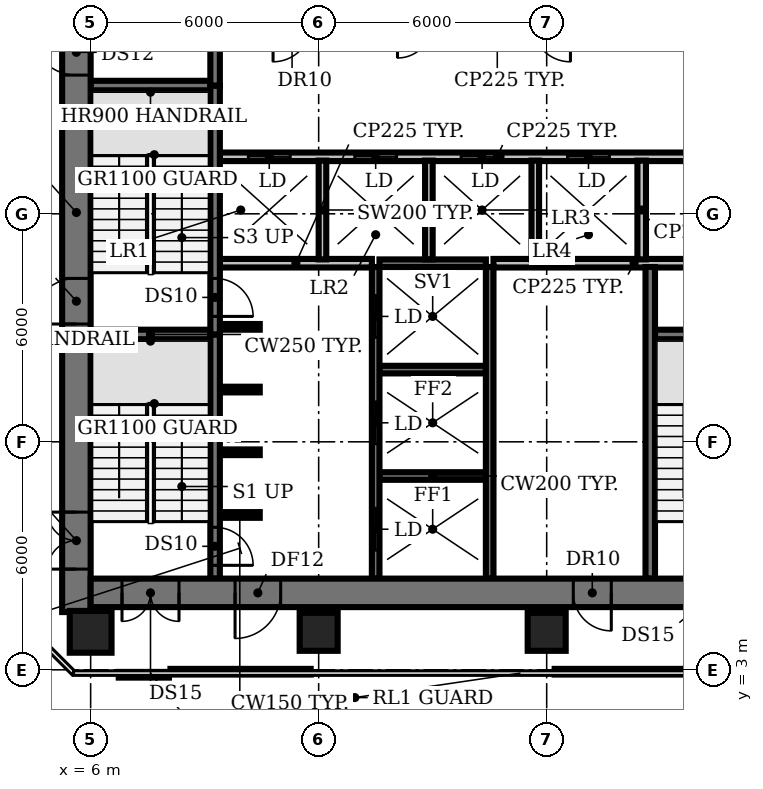
"""IFC4 building model, lengths in metres.
Left out: names, types, materials, properties, quantities, classifications, styles, units other than length and angle.
Written with IfcOpenShell. Run it as: python <this file> out.ifc"""

import sys

from ifc_helpers import new_model, si_unit, direction, frame, frame_2d, origin, origin_2d, place, context, subcontext, project, spatial, rectangle, circle, extrude, element, fill, save


model = new_model("IFC4")
c1 = context("Model", 3, precision=1e-05, world=origin(), true_north=direction((0.0, 1.0)))
c2 = subcontext(c1, "Body", "Model", "MODEL_VIEW")
j1 = project(units=[si_unit("LENGTHUNIT", "METRE"), si_unit("PLANEANGLEUNIT", "RADIAN")], contexts=[c1])
p1 = place(None, origin())
s1 = spatial("IfcSite", under=j1, at=p1, CompositionType="ELEMENT")
p2 = place(p1, origin())
s2 = spatial("IfcBuilding", under=s1, at=p2, CompositionType="ELEMENT")
p3 = place(p2, frame((0.0, 0.0, 87.8)))
s3 = spatial("IfcBuildingStorey", under=s2, at=p3, CompositionType="ELEMENT", Elevation=87.8)
p4 = place(p3, frame((6.0, 4.0, -0.35), z_axis=(0.0, 0.0, 1.0), x_axis=(1.0, 0.0, 0.0)))
e1 = element("IfcColumn", 1, at=p4, inside=s3, PredefinedType="COLUMN", context=c2, shape_type="SweptSolid", body=[
    extrude(circle(Radius=0.55, at=origin_2d()), origin(), (0.0, 0.0, 1.0), 4.2),
])
for number, where, z_axis, x_axis in (
    (2, (12.0, 4.0, -0.35), (0.0, 0.0, 1.0), (1.0, 0.0, 0.0)),
    (3, (18.0, 4.0, -0.35), (0.0, 0.0, 1.0), (1.0, 0.0, 0.0)),
):
    element("IfcColumn", number, at=place(p3, frame(where, z_axis=z_axis, x_axis=x_axis)), inside=s3, PredefinedType="COLUMN", context=c2, shape_type="SweptSolid", body=[
        extrude(rectangle(XDim=1.0, YDim=1.0, at=origin_2d()), origin(), (0.0, 0.0, 1.0), 4.2),
    ])
p5 = place(p3, frame((9.4, 7.075, 0.0), z_axis=(0.0, 0.0, 1.0), x_axis=(1.0, 0.0, 0.0)))
e4 = element("IfcWall", 4, at=p5, inside=s3, PredefinedType="SHEAR", context=c2, shape_type="SweptSolid", body=[
    extrude(rectangle(XDim=1.05, YDim=0.15, at=frame_2d((0.525, 0.0))), origin(), (0.0, 0.0, 1.0), 3.85),
])
p6 = place(p3, frame((13.6, 8.1, 0.0), z_axis=(0.0, 0.0, 1.0), x_axis=(1.0, 0.0, 0.0)))
e5 = element("IfcWall", 5, at=p6, inside=s3, PredefinedType="SHEAR", context=c2, shape_type="SweptSolid", body=[
    extrude(rectangle(XDim=2.8, YDim=0.2, at=frame_2d((1.4, 0.0))), origin(), (0.0, 0.0, 1.0), 3.85),
])
for number, where, z_axis, x_axis in (
    (6, (9.4, 8.725, 0.0), (0.0, 0.0, 1.0), (1.0, 0.0, 0.0)),
    (7, (9.4, 10.375, 0.0), (0.0, 0.0, 1.0), (1.0, 0.0, 0.0)),
):
    element("IfcWall", number, at=place(p3, frame(where, z_axis=z_axis, x_axis=x_axis)), inside=s3, PredefinedType="SHEAR", context=c2, shape_type="SweptSolid", body=[
        extrude(rectangle(XDim=1.05, YDim=0.15, at=frame_2d((0.525, 0.0))), origin(), (0.0, 0.0, 1.0), 3.85),
    ])
p7 = place(p3, frame((13.6, 10.9, 0.0), z_axis=(0.0, 0.0, 1.0), x_axis=(1.0, 0.0, 0.0)))
e8 = element("IfcWall", 8, at=p7, inside=s3, PredefinedType="SHEAR", context=c2, shape_type="SweptSolid", body=[
    extrude(rectangle(XDim=2.8, YDim=0.2, at=frame_2d((1.4, 0.0))), origin(), (0.0, 0.0, 1.0), 3.85),
])
for number, where, z_axis, x_axis in (
    (9, (6.0, 11.825, 0.0), (0.0, 0.0, 1.0), (1.0, 0.0, 0.0)),
    (10, (20.85, 11.825, 0.0), (0.0, 0.0, 1.0), (1.0, 0.0, 0.0)),
):
    element("IfcWall", number, at=place(p3, frame(where, z_axis=z_axis, x_axis=x_axis)), inside=s3, PredefinedType="SHEAR", context=c2, shape_type="SweptSolid", body=[
        extrude(rectangle(XDim=3.15, YDim=0.25, at=frame_2d((1.575, 0.0))), origin(), (0.0, 0.0, 1.0), 3.85),
    ])
p8 = place(p3, frame((9.4, 12.025, 0.0), z_axis=(0.0, 0.0, 1.0), x_axis=(1.0, 0.0, 0.0)))
e11 = element("IfcWall", 11, at=p8, inside=s3, PredefinedType="SHEAR", context=c2, shape_type="SweptSolid", body=[
    extrude(rectangle(XDim=1.05, YDim=0.15, at=frame_2d((0.525, 0.0))), origin(), (0.0, 0.0, 1.0), 3.85),
])
p9 = place(p3, frame((9.4, 13.7, 0.0), z_axis=(0.0, 0.0, 1.0), x_axis=(1.0, 0.0, 0.0)))
e12 = element("IfcWall", 12, at=p9, inside=s3, PredefinedType="PARTITIONING", context=c2, shape_type="SweptSolid", body=[
    extrude(rectangle(XDim=4.0, YDim=0.225, at=frame_2d((2.0, 0.0))), origin(), (0.0, 0.0, 1.0), 3.85),
])
p10 = place(p3, frame((13.6, 13.7, 0.0), z_axis=(0.0, 0.0, 1.0), x_axis=(1.0, 0.0, 0.0)))
e13 = element("IfcWall", 13, at=p10, inside=s3, PredefinedType="SHEAR", context=c2, shape_type="SweptSolid", body=[
    extrude(rectangle(XDim=2.8, YDim=0.2, at=frame_2d((1.4, 0.0))), origin(), (0.0, 0.0, 1.0), 3.85),
])
p11 = place(p3, frame((16.6, 13.7, 0.0), z_axis=(0.0, 0.0, 1.0), x_axis=(1.0, 0.0, 0.0)))
e14 = element("IfcWall", 14, at=p11, inside=s3, PredefinedType="PARTITIONING", context=c2, shape_type="SweptSolid", body=[
    extrude(rectangle(XDim=7.4, YDim=0.225, at=frame_2d((3.7, 0.0))), origin(), (0.0, 0.0, 1.0), 3.85),
])
p12 = place(p3, frame((9.4, 16.5, 0.0), z_axis=(0.0, 0.0, 1.0), x_axis=(1.0, 0.0, 0.0)))
e15 = element("IfcWall", 15, at=p12, inside=s3, PredefinedType="PARTITIONING", context=c2, shape_type="SweptSolid", body=[
    extrude(rectangle(XDim=14.6, YDim=0.225, at=frame_2d((7.3, 0.0))), origin(), (0.0, 0.0, 1.0), 3.85),
])
p13 = place(p12, frame((0.75, 0.0, 0.0)))
e16 = element("IfcOpeningElement", 16, at=p13, cuts=e15, PredefinedType="OPENING", context=c2, shape_type="SweptSolid", body=[
    extrude(rectangle(XDim=1.1, YDim=2.1, at=frame_2d((0.55, 1.05))), frame((0.0, 0.123, 0.0), z_axis=(0.0, -1.0, 0.0), x_axis=(1.0, 0.0, 0.0)), (0.0, 0.0, 1.0), 0.245),
])
p14 = place(p12, frame((3.55, 0.0, 0.0)))
e17 = element("IfcOpeningElement", 17, at=p14, cuts=e15, PredefinedType="OPENING", context=c2, shape_type="SweptSolid", body=[
    extrude(rectangle(XDim=1.1, YDim=2.1, at=frame_2d((0.55, 1.05))), frame((0.0, 0.123, 0.0), z_axis=(0.0, -1.0, 0.0), x_axis=(1.0, 0.0, 0.0)), (0.0, 0.0, 1.0), 0.245),
])
p15 = place(p12, frame((6.35, 0.0, 0.0)))
e18 = element("IfcOpeningElement", 18, at=p15, cuts=e15, PredefinedType="OPENING", context=c2, shape_type="SweptSolid", body=[
    extrude(rectangle(XDim=1.1, YDim=2.1, at=frame_2d((0.55, 1.05))), frame((0.0, 0.123, 0.0), z_axis=(0.0, -1.0, 0.0), x_axis=(1.0, 0.0, 0.0)), (0.0, 0.0, 1.0), 0.245),
])
p16 = place(p12, frame((9.15, 0.0, 0.0)))
e19 = element("IfcOpeningElement", 19, at=p16, cuts=e15, PredefinedType="OPENING", context=c2, shape_type="SweptSolid", body=[
    extrude(rectangle(XDim=1.1, YDim=2.1, at=frame_2d((0.55, 1.05))), frame((0.0, 0.123, 0.0), z_axis=(0.0, -1.0, 0.0), x_axis=(1.0, 0.0, 0.0)), (0.0, 0.0, 1.0), 0.245),
])
p17 = place(p12, frame((12.4, 0.0, 0.0)))
e20 = element("IfcOpeningElement", 20, at=p17, cuts=e15, PredefinedType="OPENING", context=c2, shape_type="SweptSolid", body=[
    extrude(rectangle(XDim=1.0, YDim=2.1, at=frame_2d((0.5, 1.05))), frame((0.0, 0.123, 0.0), z_axis=(0.0, -1.0, 0.0), x_axis=(1.0, 0.0, 0.0)), (0.0, 0.0, 1.0), 0.245),
])
p18 = place(p3, frame((6.0, 18.375, 0.0), z_axis=(0.0, 0.0, 1.0), x_axis=(1.0, 0.0, 0.0)))
e21 = element("IfcWall", 21, at=p18, inside=s3, PredefinedType="SHEAR", context=c2, shape_type="SweptSolid", body=[
    extrude(rectangle(XDim=3.15, YDim=0.25, at=frame_2d((1.575, 0.0))), origin(), (0.0, 0.0, 1.0), 3.85),
])
p19 = place(p3, frame((9.275, 11.825, 0.0), z_axis=(0.0, 0.0, 1.0), x_axis=(0.0, -1.0, 0.0)))
e22 = element("IfcWall", 22, at=p19, inside=s3, PredefinedType="SHEAR", context=c2, shape_type="SweptSolid", body=[
    extrude(rectangle(XDim=6.425, YDim=0.25, at=frame_2d((3.212, 0.0))), origin(), (0.0, 0.0, 1.0), 3.85),
])
p20 = place(p19, frame((5.075, 0.0, 0.0)))
e23 = element("IfcOpeningElement", 23, at=p20, cuts=e22, PredefinedType="OPENING", context=c2, shape_type="SweptSolid", body=[
    extrude(rectangle(XDim=1.0, YDim=2.1, at=frame_2d((0.5, 1.05))), frame((0.0, 0.135, 0.0), z_axis=(0.0, -1.0, 0.0), x_axis=(1.0, 0.0, 0.0)), (0.0, 0.0, 1.0), 0.27),
])
p21 = place(p3, frame((9.275, 18.375, 0.0), z_axis=(0.0, 0.0, 1.0), x_axis=(0.0, -1.0, 0.0)))
e24 = element("IfcWall", 24, at=p21, inside=s3, PredefinedType="SHEAR", context=c2, shape_type="SweptSolid", body=[
    extrude(rectangle(XDim=6.55, YDim=0.25, at=frame_2d((3.275, 0.0))), origin(), (0.0, 0.0, 1.0), 3.85),
])
p22 = place(p21, frame((5.075, 0.0, 0.0)))
e25 = element("IfcOpeningElement", 25, at=p22, cuts=e24, PredefinedType="OPENING", context=c2, shape_type="SweptSolid", body=[
    extrude(rectangle(XDim=1.0, YDim=2.1, at=frame_2d((0.5, 1.05))), frame((0.0, 0.135, 0.0), z_axis=(0.0, -1.0, 0.0), x_axis=(1.0, 0.0, 0.0)), (0.0, 0.0, 1.0), 0.27),
])
p23 = place(p3, frame((9.275, 18.375, 0.0), z_axis=(0.0, 0.0, 1.0), x_axis=(0.0, 1.0, 0.0)))
e26 = element("IfcWall", 26, at=p23, inside=s3, PredefinedType="SHEAR", context=c2, shape_type="SweptSolid", body=[
    extrude(rectangle(XDim=6.425, YDim=0.25, at=frame_2d((3.212, 0.0))), origin(), (0.0, 0.0, 1.0), 3.85),
])
p24 = place(p3, frame((12.1, 13.8, 0.0), z_axis=(0.0, 0.0, 1.0), x_axis=(0.0, 1.0, 0.0)))
e27 = element("IfcWall", 27, at=p24, inside=s3, PredefinedType="SOLIDWALL", context=c2, shape_type="SweptSolid", body=[
    extrude(rectangle(XDim=2.6, YDim=0.2, at=frame_2d((1.3, 0.0))), origin(), (0.0, 0.0, 1.0), 3.85),
])
p25 = place(p3, frame((13.5, 5.4, 0.0), z_axis=(0.0, 0.0, 1.0), x_axis=(0.0, 1.0, 0.0)))
e28 = element("IfcWall", 28, at=p25, inside=s3, PredefinedType="SHEAR", context=c2, shape_type="SweptSolid", body=[
    extrude(rectangle(XDim=8.2, YDim=0.2, at=frame_2d((4.1, 0.0))), origin(), (0.0, 0.0, 1.0), 3.85),
])
p26 = place(p25, frame((0.75, 0.0, 0.0)))
e29 = element("IfcOpeningElement", 29, at=p26, cuts=e28, PredefinedType="OPENING", context=c2, shape_type="SweptSolid", body=[
    extrude(rectangle(XDim=1.1, YDim=2.1, at=frame_2d((0.55, 1.05))), frame((0.0, 0.11, 0.0), z_axis=(0.0, -1.0, 0.0), x_axis=(1.0, 0.0, 0.0)), (0.0, 0.0, 1.0), 0.22),
])
p27 = place(p25, frame((3.55, 0.0, 0.0)))
e30 = element("IfcOpeningElement", 30, at=p27, cuts=e28, PredefinedType="OPENING", context=c2, shape_type="SweptSolid", body=[
    extrude(rectangle(XDim=1.1, YDim=2.1, at=frame_2d((0.55, 1.05))), frame((0.0, 0.11, 0.0), z_axis=(0.0, -1.0, 0.0), x_axis=(1.0, 0.0, 0.0)), (0.0, 0.0, 1.0), 0.22),
])
p28 = place(p25, frame((6.35, 0.0, 0.0)))
e31 = element("IfcOpeningElement", 31, at=p28, cuts=e28, PredefinedType="OPENING", context=c2, shape_type="SweptSolid", body=[
    extrude(rectangle(XDim=1.1, YDim=2.1, at=frame_2d((0.55, 1.05))), frame((0.0, 0.11, 0.0), z_axis=(0.0, -1.0, 0.0), x_axis=(1.0, 0.0, 0.0)), (0.0, 0.0, 1.0), 0.22),
])
p29 = place(p3, frame((14.9, 13.8, 0.0), z_axis=(0.0, 0.0, 1.0), x_axis=(0.0, 1.0, 0.0)))
e32 = element("IfcWall", 32, at=p29, inside=s3, PredefinedType="SOLIDWALL", context=c2, shape_type="SweptSolid", body=[
    extrude(rectangle(XDim=2.6, YDim=0.2, at=frame_2d((1.3, 0.0))), origin(), (0.0, 0.0, 1.0), 3.85),
])
p30 = place(p3, frame((16.5, 5.4, 0.0), z_axis=(0.0, 0.0, 1.0), x_axis=(0.0, 1.0, 0.0)))
e33 = element("IfcWall", 33, at=p30, inside=s3, PredefinedType="SHEAR", context=c2, shape_type="SweptSolid", body=[
    extrude(rectangle(XDim=8.2, YDim=0.2, at=frame_2d((4.1, 0.0))), origin(), (0.0, 0.0, 1.0), 3.85),
])
p31 = place(p3, frame((17.7, 13.8, 0.0), z_axis=(0.0, 0.0, 1.0), x_axis=(0.0, 1.0, 0.0)))
e34 = element("IfcWall", 34, at=p31, inside=s3, PredefinedType="SOLIDWALL", context=c2, shape_type="SweptSolid", body=[
    extrude(rectangle(XDim=2.6, YDim=0.2, at=frame_2d((1.3, 0.0))), origin(), (0.0, 0.0, 1.0), 3.85),
])
p32 = place(p3, frame((20.5, 13.8, 0.0), z_axis=(0.0, 0.0, 1.0), x_axis=(0.0, 1.0, 0.0)))
e35 = element("IfcWall", 35, at=p32, inside=s3, PredefinedType="PARTITIONING", context=c2, shape_type="SweptSolid", body=[
    extrude(rectangle(XDim=2.6, YDim=0.225, at=frame_2d((1.3, 0.0))), origin(), (0.0, 0.0, 1.0), 3.85),
])
p33 = place(p3, frame((20.725, 5.4, 0.0), z_axis=(0.0, 0.0, 1.0), x_axis=(0.0, 1.0, 0.0)))
e36 = element("IfcWall", 36, at=p33, inside=s3, PredefinedType="SHEAR", context=c2, shape_type="SweptSolid", body=[
    extrude(rectangle(XDim=8.2, YDim=0.25, at=frame_2d((4.1, 0.0))), origin(), (0.0, 0.0, 1.0), 3.85),
])
p34 = place(p3, frame((5.625, 4.52, 0.0), z_axis=(0.0, 0.0, 1.0), x_axis=(0.0, 1.0, 0.0)))
e37 = element("IfcWall", 37, at=p34, inside=s3, PredefinedType="SHEAR", context=c2, shape_type="SweptSolid", body=[
    extrude(rectangle(XDim=21.03, YDim=0.75, at=frame_2d((10.515, 0.0))), origin(), (0.0, 0.0, 1.0), 3.85),
])
p35 = place(p34, frame((1.13, 0.0, 0.0)))
e38 = element("IfcOpeningElement", 38, at=p35, cuts=e37, PredefinedType="OPENING", context=c2, shape_type="SweptSolid", body=[
    extrude(rectangle(XDim=1.5, YDim=2.1, at=frame_2d((0.75, 1.05))), frame((0.0, 0.385, 0.0), z_axis=(0.0, -1.0, 0.0), x_axis=(1.0, 0.0, 0.0)), (0.0, 0.0, 1.0), 0.77),
])
p36 = place(p34, frame((7.58, 0.0, 0.0)))
e39 = element("IfcOpeningElement", 39, at=p36, cuts=e37, PredefinedType="OPENING", context=c2, shape_type="SweptSolid", body=[
    extrude(rectangle(XDim=1.2, YDim=2.1, at=frame_2d((0.6, 1.05))), frame((0.0, 0.385, 0.0), z_axis=(0.0, -1.0, 0.0), x_axis=(1.0, 0.0, 0.0)), (0.0, 0.0, 1.0), 0.77),
])
p37 = place(p34, frame((14.13, 0.0, 0.0)))
e40 = element("IfcOpeningElement", 40, at=p37, cuts=e37, PredefinedType="OPENING", context=c2, shape_type="SweptSolid", body=[
    extrude(rectangle(XDim=1.2, YDim=2.1, at=frame_2d((0.6, 1.05))), frame((0.0, 0.385, 0.0), z_axis=(0.0, -1.0, 0.0), x_axis=(1.0, 0.0, 0.0)), (0.0, 0.0, 1.0), 0.77),
])
p38 = place(p3, frame((24.0, 5.025, 0.0), z_axis=(0.0, 0.0, 1.0), x_axis=(-1.0, 0.0, 0.0)))
e41 = element("IfcWall", 41, at=p38, inside=s3, PredefinedType="SHEAR", context=c2, shape_type="SweptSolid", body=[
    extrude(rectangle(XDim=18.0, YDim=0.75, at=frame_2d((9.0, 0.0))), origin(), (0.0, 0.0, 1.0), 3.85),
])
p39 = place(p38, frame((0.825, 0.0, 0.0)))
e42 = element("IfcOpeningElement", 42, at=p39, cuts=e41, PredefinedType="OPENING", context=c2, shape_type="SweptSolid", body=[
    extrude(rectangle(XDim=1.5, YDim=2.1, at=frame_2d((0.75, 1.05))), frame((0.0, 0.385, 0.0), z_axis=(0.0, -1.0, 0.0), x_axis=(1.0, 0.0, 0.0)), (0.0, 0.0, 1.0), 0.77),
])
p40 = place(p38, frame((15.675, 0.0, 0.0)))
e43 = element("IfcOpeningElement", 43, at=p40, cuts=e41, PredefinedType="OPENING", context=c2, shape_type="SweptSolid", body=[
    extrude(rectangle(XDim=1.5, YDim=2.1, at=frame_2d((0.75, 1.05))), frame((0.0, 0.385, 0.0), z_axis=(0.0, -1.0, 0.0), x_axis=(1.0, 0.0, 0.0)), (0.0, 0.0, 1.0), 0.77),
])
p41 = place(p38, frame((13.0, 0.0, 0.0)))
e44 = element("IfcOpeningElement", 44, at=p41, cuts=e41, PredefinedType="OPENING", context=c2, shape_type="SweptSolid", body=[
    extrude(rectangle(XDim=1.2, YDim=2.1, at=frame_2d((0.6, 1.05))), frame((0.0, 0.385, 0.0), z_axis=(0.0, -1.0, 0.0), x_axis=(1.0, 0.0, 0.0)), (0.0, 0.0, 1.0), 0.77),
])
p42 = place(p38, frame((4.3, 0.0, 0.0)))
e45 = element("IfcOpeningElement", 45, at=p42, cuts=e41, PredefinedType="OPENING", context=c2, shape_type="SweptSolid", body=[
    extrude(rectangle(XDim=1.0, YDim=2.1, at=frame_2d((0.5, 1.05))), frame((0.0, 0.385, 0.0), z_axis=(0.0, -1.0, 0.0), x_axis=(1.0, 0.0, 0.0)), (0.0, 0.0, 1.0), 0.77),
])
p43 = place(p3, frame((6.74, 2.87, 0.0), z_axis=(0.0, 0.0, 1.0), x_axis=(1.0, 0.0, 0.0)))
e46 = element("IfcWall", 46, at=p43, inside=s3, PredefinedType="PARTITIONING", context=c2, shape_type="SweptSolid", body=[
    extrude(rectangle(XDim=1.32, YDim=0.15, at=frame_2d((0.66, 0.0))), origin(), (0.0, 0.0, 1.0), 2.83),
])
p44 = place(p3, frame((8.1, 2.95, 0.0), z_axis=(0.0, 0.0, 1.0), x_axis=(1.0, 0.0, 0.0)))
e47 = element("IfcWall", 47, at=p44, inside=s3, PredefinedType="PARTITIONING", context=c2, shape_type="SweptSolid", body=[
    extrude(rectangle(XDim=3.69, YDim=0.15, at=frame_2d((1.845, 0.0))), origin(), (0.0, 0.0, 1.0), 2.83),
])
p45 = place(p3, frame((18.21, 2.95, 0.0), z_axis=(0.0, 0.0, 1.0), x_axis=(1.0, 0.0, 0.0)))
e48 = element("IfcWall", 48, at=p45, inside=s3, PredefinedType="PARTITIONING", context=c2, shape_type="SweptSolid", body=[
    extrude(rectangle(XDim=3.75, YDim=0.15, at=frame_2d((1.875, 0.0))), origin(), (0.0, 0.0, 1.0), 2.83),
])
p46 = place(p13, origin())
e49 = element("IfcDoor", 49, at=p46, inside=s3, OperationType="DOUBLE_DOOR_SLIDING", PredefinedType="DOOR", context=c2, shape_type="SweptSolid", body=[
    extrude(rectangle(XDim=1.1, YDim=2.1, at=frame_2d((0.55, 1.05))), frame((0.0, 0.025, 0.0), z_axis=(0.0, -1.0, 0.0), x_axis=(1.0, 0.0, 0.0)), (0.0, 0.0, 1.0), 0.05),
])
fill(e16, e49)
p47 = place(p14, origin())
e50 = element("IfcDoor", 50, at=p47, inside=s3, OperationType="DOUBLE_DOOR_SLIDING", PredefinedType="DOOR", context=c2, shape_type="SweptSolid", body=[
    extrude(rectangle(XDim=1.1, YDim=2.1, at=frame_2d((0.55, 1.05))), frame((0.0, 0.025, 0.0), z_axis=(0.0, -1.0, 0.0), x_axis=(1.0, 0.0, 0.0)), (0.0, 0.0, 1.0), 0.05),
])
fill(e17, e50)
p48 = place(p15, origin())
e51 = element("IfcDoor", 51, at=p48, inside=s3, OperationType="DOUBLE_DOOR_SLIDING", PredefinedType="DOOR", context=c2, shape_type="SweptSolid", body=[
    extrude(rectangle(XDim=1.1, YDim=2.1, at=frame_2d((0.55, 1.05))), frame((0.0, 0.025, 0.0), z_axis=(0.0, -1.0, 0.0), x_axis=(1.0, 0.0, 0.0)), (0.0, 0.0, 1.0), 0.05),
])
fill(e18, e51)
p49 = place(p16, origin())
e52 = element("IfcDoor", 52, at=p49, inside=s3, OperationType="DOUBLE_DOOR_SLIDING", PredefinedType="DOOR", context=c2, shape_type="SweptSolid", body=[
    extrude(rectangle(XDim=1.1, YDim=2.1, at=frame_2d((0.55, 1.05))), frame((0.0, 0.025, 0.0), z_axis=(0.0, -1.0, 0.0), x_axis=(1.0, 0.0, 0.0)), (0.0, 0.0, 1.0), 0.05),
])
fill(e19, e52)
p50 = place(p20, origin())
e53 = element("IfcDoor", 53, at=p50, inside=s3, OperationType="SINGLE_SWING_RIGHT", PredefinedType="DOOR", context=c2, shape_type="SweptSolid", body=[
    extrude(rectangle(XDim=1.0, YDim=2.1, at=frame_2d((0.5, 1.05))), frame((0.0, 0.025, 0.0), z_axis=(0.0, -1.0, 0.0), x_axis=(1.0, 0.0, 0.0)), (0.0, 0.0, 1.0), 0.05),
])
fill(e23, e53)
p51 = place(p22, origin())
e54 = element("IfcDoor", 54, at=p51, inside=s3, OperationType="SINGLE_SWING_RIGHT", PredefinedType="DOOR", context=c2, shape_type="SweptSolid", body=[
    extrude(rectangle(XDim=1.0, YDim=2.1, at=frame_2d((0.5, 1.05))), frame((0.0, 0.025, 0.0), z_axis=(0.0, -1.0, 0.0), x_axis=(1.0, 0.0, 0.0)), (0.0, 0.0, 1.0), 0.05),
])
fill(e25, e54)
p52 = place(p26, origin())
e55 = element("IfcDoor", 55, at=p52, inside=s3, OperationType="DOUBLE_DOOR_SLIDING", PredefinedType="DOOR", context=c2, shape_type="SweptSolid", body=[
    extrude(rectangle(XDim=1.1, YDim=2.1, at=frame_2d((0.55, 1.05))), frame((0.0, 0.025, 0.0), z_axis=(0.0, -1.0, 0.0), x_axis=(1.0, 0.0, 0.0)), (0.0, 0.0, 1.0), 0.05),
])
fill(e29, e55)
p53 = place(p27, origin())
e56 = element("IfcDoor", 56, at=p53, inside=s3, OperationType="DOUBLE_DOOR_SLIDING", PredefinedType="DOOR", context=c2, shape_type="SweptSolid", body=[
    extrude(rectangle(XDim=1.1, YDim=2.1, at=frame_2d((0.55, 1.05))), frame((0.0, 0.025, 0.0), z_axis=(0.0, -1.0, 0.0), x_axis=(1.0, 0.0, 0.0)), (0.0, 0.0, 1.0), 0.05),
])
fill(e30, e56)
p54 = place(p28, origin())
e57 = element("IfcDoor", 57, at=p54, inside=s3, OperationType="DOUBLE_DOOR_SLIDING", PredefinedType="DOOR", context=c2, shape_type="SweptSolid", body=[
    extrude(rectangle(XDim=1.1, YDim=2.1, at=frame_2d((0.55, 1.05))), frame((0.0, 0.025, 0.0), z_axis=(0.0, -1.0, 0.0), x_axis=(1.0, 0.0, 0.0)), (0.0, 0.0, 1.0), 0.05),
])
fill(e31, e57)
p55 = place(p35, origin())
e58 = element("IfcDoor", 58, at=p55, inside=s3, OperationType="DOUBLE_DOOR_SINGLE_SWING", PredefinedType="DOOR", context=c2, shape_type="SweptSolid", body=[
    extrude(rectangle(XDim=1.5, YDim=2.1, at=frame_2d((0.75, 1.05))), frame((0.0, 0.025, 0.0), z_axis=(0.0, -1.0, 0.0), x_axis=(1.0, 0.0, 0.0)), (0.0, 0.0, 1.0), 0.05),
])
fill(e38, e58)
p56 = place(p36, origin())
e59 = element("IfcDoor", 59, at=p56, inside=s3, OperationType="SINGLE_SWING_LEFT", PredefinedType="DOOR", context=c2, shape_type="SweptSolid", body=[
    extrude(rectangle(XDim=1.2, YDim=2.1, at=frame_2d((0.6, 1.05))), frame((0.0, 0.025, 0.0), z_axis=(0.0, -1.0, 0.0), x_axis=(1.0, 0.0, 0.0)), (0.0, 0.0, 1.0), 0.05),
])
fill(e39, e59)
p57 = place(p37, origin())
e60 = element("IfcDoor", 60, at=p57, inside=s3, OperationType="SINGLE_SWING_RIGHT", PredefinedType="DOOR", context=c2, shape_type="SweptSolid", body=[
    extrude(rectangle(XDim=1.2, YDim=2.1, at=frame_2d((0.6, 1.05))), frame((0.0, 0.025, 0.0), z_axis=(0.0, -1.0, 0.0), x_axis=(1.0, 0.0, 0.0)), (0.0, 0.0, 1.0), 0.05),
])
fill(e40, e60)
p58 = place(p40, origin())
e61 = element("IfcDoor", 61, at=p58, inside=s3, OperationType="DOUBLE_DOOR_SINGLE_SWING", PredefinedType="DOOR", context=c2, shape_type="SweptSolid", body=[
    extrude(rectangle(XDim=1.5, YDim=2.1, at=frame_2d((0.75, 1.05))), frame((0.0, 0.025, 0.0), z_axis=(0.0, -1.0, 0.0), x_axis=(1.0, 0.0, 0.0)), (0.0, 0.0, 1.0), 0.05),
])
fill(e43, e61)
p59 = place(p41, origin())
e62 = element("IfcDoor", 62, at=p59, inside=s3, OperationType="SINGLE_SWING_RIGHT", PredefinedType="DOOR", context=c2, shape_type="SweptSolid", body=[
    extrude(rectangle(XDim=1.2, YDim=2.1, at=frame_2d((0.6, 1.05))), frame((0.0, 0.025, 0.0), z_axis=(0.0, -1.0, 0.0), x_axis=(1.0, 0.0, 0.0)), (0.0, 0.0, 1.0), 0.05),
])
fill(e44, e62)
p60 = place(p42, origin())
e63 = element("IfcDoor", 63, at=p60, inside=s3, OperationType="SINGLE_SWING_LEFT", PredefinedType="DOOR", context=c2, shape_type="SweptSolid", body=[
    extrude(rectangle(XDim=1.0, YDim=2.1, at=frame_2d((0.5, 1.05))), frame((0.0, -0.315, 0.0), z_axis=(0.0, -1.0, 0.0), x_axis=(1.0, 0.0, 0.0)), (0.0, 0.0, 1.0), 0.05),
])
fill(e45, e63)
save(model, sys.argv[1])
